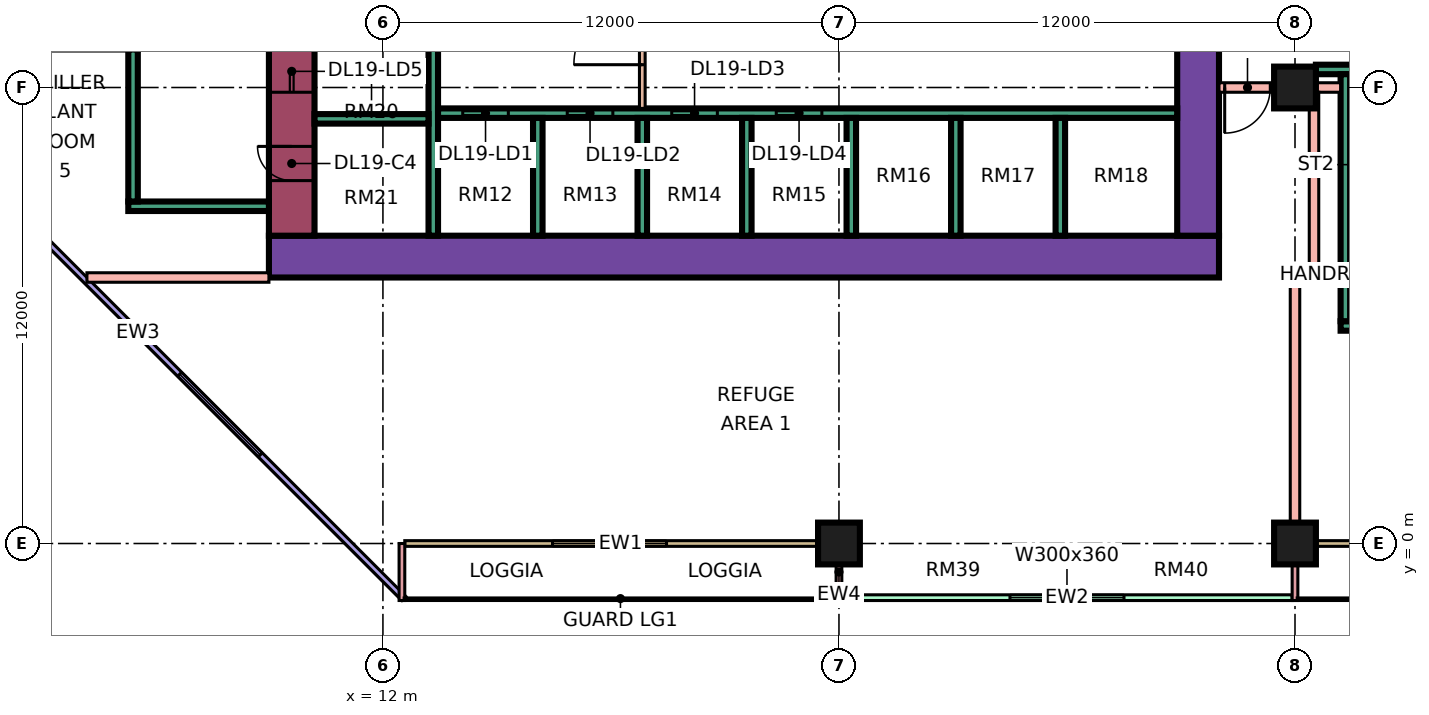
"""IFC4 building model, lengths in metres.
Left out: names, types, materials, properties, quantities, classifications, styles, units other than length and angle.
Written with IfcOpenShell. Run it as: python <this file> out.ifc"""

import sys

from ifc_helpers import new_model, si_unit, direction, frame, frame_2d, origin, origin_2d, place, context, subcontext, project, spatial, rectangle, extrude, element, fill, save


model = new_model("IFC4")
c1 = context("Model", 3, precision=1e-05, world=origin(), true_north=direction((0.0, 1.0)))
c2 = subcontext(c1, "Body", "Model", "MODEL_VIEW")
j1 = project(units=[si_unit("LENGTHUNIT", "METRE"), si_unit("PLANEANGLEUNIT", "RADIAN")], contexts=[c1])
p1 = place(None, origin())
s1 = spatial("IfcSite", under=j1, at=p1, CompositionType="ELEMENT")
p2 = place(p1, origin())
s2 = spatial("IfcBuilding", under=s1, at=p2, CompositionType="ELEMENT")
p3 = place(p2, frame((0.0, 0.0, 86.4)))
s3 = spatial("IfcBuildingStorey", under=s2, at=p3, CompositionType="ELEMENT", Elevation=86.4)
for number, where, z_axis, x_axis in (
    (1, (24.0, 0.0, 0.0), (0.0, 0.0, 1.0), (1.0, 0.0, 0.0)),
    (2, (36.0, 0.0, 0.0), (0.0, 0.0, 1.0), (1.0, 0.0, 0.0)),
    (3, (36.0, 12.0, 0.0), (0.0, 0.0, 1.0), (1.0, 0.0, 0.0)),
):
    element("IfcColumn", number, at=place(p3, frame(where, z_axis=z_axis, x_axis=x_axis)), inside=s3, PredefinedType="COLUMN", context=c2, shape_type="SweptSolid", body=[
        extrude(rectangle(XDim=1.1, YDim=1.1, at=origin_2d()), origin(), (0.0, 0.0, 1.0), 5.5),
    ])
p4 = place(p3, frame((9.0, 7.55, 0.0), z_axis=(0.0, 0.0, 1.0), x_axis=(1.0, 0.0, 0.0)))
e4 = element("IfcWall", 4, at=p4, inside=s3, PredefinedType="SHEAR", context=c2, shape_type="SweptSolid", body=[
    extrude(rectangle(XDim=25.0, YDim=1.1, at=frame_2d((12.5, 0.0))), origin(), (0.0, 0.0, 1.0), 5.5),
])
p5 = place(p3, frame((9.6, 8.1, 0.0), z_axis=(0.0, 0.0, 1.0), x_axis=(0.0, 1.0, 0.0)))
e5 = element("IfcWall", 5, at=p5, inside=s3, PredefinedType="SHEAR", context=c2, shape_type="SweptSolid", body=[
    extrude(rectangle(XDim=10.8, YDim=1.2, at=frame_2d((5.4, 0.0))), origin(), (0.0, 0.0, 1.0), 5.5),
])
p6 = place(p5, frame((3.775, 0.0, 0.0)))
e6 = element("IfcOpeningElement", 6, at=p6, cuts=e5, PredefinedType="OPENING", context=c2, shape_type="SweptSolid", body=[
    extrude(rectangle(XDim=1.1, YDim=2.2, at=frame_2d((0.55, 1.1))), frame((0.0, 0.61, 0.0), z_axis=(0.0, -1.0, 0.0), x_axis=(1.0, 0.0, 0.0)), (0.0, 0.0, 1.0), 1.22),
])
p7 = place(p5, frame((6.275, 0.0, 0.0)))
e7 = element("IfcOpeningElement", 7, at=p7, cuts=e5, PredefinedType="OPENING", context=c2, shape_type="SweptSolid", body=[
    extrude(rectangle(XDim=1.1, YDim=2.2, at=frame_2d((0.55, 1.1))), frame((0.0, 0.61, 0.0), z_axis=(0.0, -1.0, 0.0), x_axis=(1.0, 0.0, 0.0)), (0.0, 0.0, 1.0), 1.22),
])
p8 = place(p5, frame((8.95, 0.0, 0.0)))
e8 = element("IfcOpeningElement", 8, at=p8, cuts=e5, PredefinedType="OPENING", context=c2, shape_type="SweptSolid", body=[
    extrude(rectangle(XDim=1.1, YDim=2.2, at=frame_2d((0.55, 1.1))), frame((0.0, 0.61, 0.0), z_axis=(0.0, -1.0, 0.0), x_axis=(1.0, 0.0, 0.0)), (0.0, 0.0, 1.0), 1.22),
])
p9 = place(p5, frame((1.45, 0.0, 0.0)))
e9 = element("IfcOpeningElement", 9, at=p9, cuts=e5, PredefinedType="OPENING", context=c2, shape_type="SweptSolid", body=[
    extrude(rectangle(XDim=0.9, YDim=2.1, at=frame_2d((0.45, 1.05))), frame((0.0, 0.61, 0.0), z_axis=(0.0, -1.0, 0.0), x_axis=(1.0, 0.0, 0.0)), (0.0, 0.0, 1.0), 1.22),
])
p10 = place(p3, frame((33.45, 8.1, 0.0), z_axis=(0.0, 0.0, 1.0), x_axis=(0.0, 1.0, 0.0)))
e10 = element("IfcWall", 10, at=p10, inside=s3, PredefinedType="SHEAR", context=c2, shape_type="SweptSolid", body=[
    extrude(rectangle(XDim=10.8, YDim=1.1, at=frame_2d((5.4, 0.0))), origin(), (0.0, 0.0, 1.0), 5.5),
])
p11 = place(p10, frame((5.1, 0.0, 0.0)))
e11 = element("IfcOpeningElement", 11, at=p11, cuts=e10, PredefinedType="OPENING", context=c2, shape_type="SweptSolid", body=[
    extrude(rectangle(XDim=1.8, YDim=2.4, at=frame_2d((0.9, 1.2))), frame((0.0, 0.56, 0.0), z_axis=(0.0, -1.0, 0.0), x_axis=(1.0, 0.0, 0.0)), (0.0, 0.0, 1.0), 1.12),
])
p12 = place(p3, frame((13.325, 8.1, 0.0), z_axis=(0.0, 0.0, 1.0), x_axis=(0.0, 1.0, 0.0)))
e12 = element("IfcWall", 12, at=p12, inside=s3, PredefinedType="SHEAR", context=c2, shape_type="SweptSolid", body=[
    extrude(rectangle(XDim=10.8, YDim=0.25, at=frame_2d((5.4, 0.0))), origin(), (0.0, 0.0, 1.0), 5.5),
])
p13 = place(p3, frame((13.45, 11.325, 0.0), z_axis=(0.0, 0.0, 1.0), x_axis=(1.0, 0.0, 0.0)))
e13 = element("IfcWall", 13, at=p13, inside=s3, PredefinedType="SHEAR", context=c2, shape_type="SweptSolid", body=[
    extrude(rectangle(XDim=19.45, YDim=0.25, at=frame_2d((9.725, 0.0))), origin(), (0.0, 0.0, 1.0), 5.5),
])
p14 = place(p13, frame((0.65, 0.0, 0.0)))
e14 = element("IfcOpeningElement", 14, at=p14, cuts=e13, PredefinedType="OPENING", context=c2, shape_type="SweptSolid", body=[
    extrude(rectangle(XDim=1.2, YDim=2.2, at=frame_2d((0.6, 1.1))), frame((0.0, 0.135, 0.0), z_axis=(0.0, -1.0, 0.0), x_axis=(1.0, 0.0, 0.0)), (0.0, 0.0, 1.0), 0.27),
])
p15 = place(p13, frame((3.4, 0.0, 0.0)))
e15 = element("IfcOpeningElement", 15, at=p15, cuts=e13, PredefinedType="OPENING", context=c2, shape_type="SweptSolid", body=[
    extrude(rectangle(XDim=1.2, YDim=2.2, at=frame_2d((0.6, 1.1))), frame((0.0, 0.135, 0.0), z_axis=(0.0, -1.0, 0.0), x_axis=(1.0, 0.0, 0.0)), (0.0, 0.0, 1.0), 0.27),
])
p16 = place(p13, frame((6.15, 0.0, 0.0)))
e16 = element("IfcOpeningElement", 16, at=p16, cuts=e13, PredefinedType="OPENING", context=c2, shape_type="SweptSolid", body=[
    extrude(rectangle(XDim=1.2, YDim=2.2, at=frame_2d((0.6, 1.1))), frame((0.0, 0.135, 0.0), z_axis=(0.0, -1.0, 0.0), x_axis=(1.0, 0.0, 0.0)), (0.0, 0.0, 1.0), 0.27),
])
p17 = place(p13, frame((8.9, 0.0, 0.0)))
e17 = element("IfcOpeningElement", 17, at=p17, cuts=e13, PredefinedType="OPENING", context=c2, shape_type="SweptSolid", body=[
    extrude(rectangle(XDim=1.2, YDim=2.2, at=frame_2d((0.6, 1.1))), frame((0.0, 0.135, 0.0), z_axis=(0.0, -1.0, 0.0), x_axis=(1.0, 0.0, 0.0)), (0.0, 0.0, 1.0), 0.27),
])
p18 = place(p3, frame((10.2, 11.175, 0.0), z_axis=(0.0, 0.0, 1.0), x_axis=(1.0, 0.0, 0.0)))
e18 = element("IfcWall", 18, at=p18, inside=s3, PredefinedType="SHEAR", context=c2, shape_type="SweptSolid", body=[
    extrude(rectangle(XDim=3.0, YDim=0.25, at=frame_2d((1.5, 0.0))), origin(), (0.0, 0.0, 1.0), 5.5),
])
for number, where, z_axis, x_axis in (
    (19, (16.075, 8.1, 0.0), (0.0, 0.0, 1.0), (0.0, 1.0, 0.0)),
    (20, (18.825, 8.1, 0.0), (0.0, 0.0, 1.0), (0.0, 1.0, 0.0)),
    (21, (21.575, 8.1, 0.0), (0.0, 0.0, 1.0), (0.0, 1.0, 0.0)),
    (22, (24.325, 8.1, 0.0), (0.0, 0.0, 1.0), (0.0, 1.0, 0.0)),
    (23, (27.075, 8.1, 0.0), (0.0, 0.0, 1.0), (0.0, 1.0, 0.0)),
    (24, (29.825, 8.1, 0.0), (0.0, 0.0, 1.0), (0.0, 1.0, 0.0)),
):
    element("IfcWall", number, at=place(p3, frame(where, z_axis=z_axis, x_axis=x_axis)), inside=s3, PredefinedType="SHEAR", context=c2, shape_type="SweptSolid", body=[
        extrude(rectangle(XDim=3.1, YDim=0.25, at=frame_2d((1.55, 0.0))), origin(), (0.0, 0.0, 1.0), 5.5),
    ])
p19 = place(p3, frame((5.3, 8.875, 0.0), z_axis=(0.0, 0.0, 1.0), x_axis=(1.0, 0.0, 0.0)))
e25 = element("IfcWall", 25, at=p19, inside=s3, PredefinedType="SHEAR", context=c2, shape_type="SweptSolid", body=[
    extrude(rectangle(XDim=3.7, YDim=0.25, at=frame_2d((1.85, 0.0))), origin(), (0.0, 0.0, 1.0), 5.5),
])
p20 = place(p3, frame((5.425, 9.0, 0.0), z_axis=(0.0, 0.0, 1.0), x_axis=(0.0, 1.0, 0.0)))
e26 = element("IfcWall", 26, at=p20, inside=s3, PredefinedType="SHEAR", context=c2, shape_type="SweptSolid", body=[
    extrude(rectangle(XDim=4.0, YDim=0.25, at=frame_2d((2.0, 0.0))), origin(), (0.0, 0.0, 1.0), 5.5),
])
p21 = place(p3, frame((37.2, 5.725, 0.0), z_axis=(0.0, 0.0, 1.0), x_axis=(1.0, 0.0, 0.0)))
e27 = element("IfcWall", 27, at=p21, inside=s3, PredefinedType="SHEAR", context=c2, shape_type="SweptSolid", body=[
    extrude(rectangle(XDim=3.45, YDim=0.25, at=frame_2d((1.725, 0.0))), origin(), (0.0, 0.0, 1.0), 5.5),
])
p22 = place(p3, frame((36.55, 12.475, 0.0), z_axis=(0.0, 0.0, 1.0), x_axis=(1.0, 0.0, 0.0)))
e28 = element("IfcWall", 28, at=p22, inside=s3, PredefinedType="SHEAR", context=c2, shape_type="SweptSolid", body=[
    extrude(rectangle(XDim=4.1, YDim=0.25, at=frame_2d((2.05, 0.0))), origin(), (0.0, 0.0, 1.0), 5.5),
])
p23 = place(p22, frame((1.825, 0.0, 0.0)))
e29 = element("IfcOpeningElement", 29, at=p23, cuts=e28, PredefinedType="OPENING", context=c2, shape_type="SweptSolid", body=[
    extrude(rectangle(XDim=1.1, YDim=2.2, at=frame_2d((0.55, 1.1))), frame((0.0, 0.135, 0.0), z_axis=(0.0, -1.0, 0.0), x_axis=(1.0, 0.0, 0.0)), (0.0, 0.0, 1.0), 0.27),
])
p24 = place(p3, frame((37.325, 5.85, 0.0), z_axis=(0.0, 0.0, 1.0), x_axis=(0.0, 1.0, 0.0)))
e30 = element("IfcWall", 30, at=p24, inside=s3, PredefinedType="SHEAR", context=c2, shape_type="SweptSolid", body=[
    extrude(rectangle(XDim=6.5, YDim=0.25, at=frame_2d((3.25, 0.0))), origin(), (0.0, 0.0, 1.0), 5.5),
])
p25 = place(p3, frame((-1.447, 12.553, 0.0), z_axis=(0.0, 0.0, 1.0), x_axis=(0.707106781187, -0.707106781187, 0.0)))
e31 = element("IfcWall", 31, at=p25, inside=s3, PredefinedType="SOLIDWALL", context=c2, shape_type="SweptSolid", body=[
    extrude(rectangle(XDim=19.799, YDim=0.15, at=frame_2d((9.899, 0.0))), origin(), (0.0, 0.0, 1.0), 5.1),
])
p26 = place(p25, frame((11.453, 0.0, 0.45)))
e32 = element("IfcOpeningElement", 32, at=p26, cuts=e31, PredefinedType="OPENING", context=c2, shape_type="SweptSolid", body=[
    extrude(rectangle(XDim=3.0, YDim=3.6, at=frame_2d((1.5, 1.8))), frame((0.0, 0.085, 0.0), z_axis=(0.0, -1.0, 0.0), x_axis=(1.0, 0.0, 0.0)), (0.0, 0.0, 1.0), 0.17),
])
p27 = place(p3, frame((12.575, 0.0, 0.0), z_axis=(0.0, 0.0, 1.0), x_axis=(1.0, 0.0, 0.0)))
e33 = element("IfcWall", 33, at=p27, inside=s3, PredefinedType="SOLIDWALL", context=c2, shape_type="SweptSolid", body=[
    extrude(rectangle(XDim=11.35, YDim=0.15, at=frame_2d((5.675, 0.0))), origin(), (0.0, 0.0, 1.0), 5.1),
])
p28 = place(p27, frame((3.887, 0.0, 0.45)))
e34 = element("IfcOpeningElement", 34, at=p28, cuts=e33, PredefinedType="OPENING", context=c2, shape_type="SweptSolid", body=[
    extrude(rectangle(XDim=3.0, YDim=3.6, at=frame_2d((1.5, 1.8))), frame((0.0, 0.085, 0.0), z_axis=(0.0, -1.0, 0.0), x_axis=(1.0, 0.0, 0.0)), (0.0, 0.0, 1.0), 0.17),
])
for number, where, z_axis, x_axis in (
    (35, (12.5, -1.5, 0.0), (0.0, 0.0, 1.0), (0.0, 1.0, 0.0)),
    (36, (24.0, -1.5, 0.0), (0.0, 0.0, 1.0), (0.0, 1.0, 0.0)),
):
    element("IfcWall", number, at=place(p3, frame(where, z_axis=z_axis, x_axis=x_axis)), inside=s3, PredefinedType="SOLIDWALL", context=c2, shape_type="SweptSolid", body=[
        extrude(rectangle(XDim=1.5, YDim=0.15, at=frame_2d((0.75, 0.0))), origin(), (0.0, 0.0, 1.0), 5.1),
    ])
p29 = place(p3, frame((24.075, -1.425, 0.0), z_axis=(0.0, 0.0, 1.0), x_axis=(1.0, 0.0, 0.0)))
e37 = element("IfcWall", 37, at=p29, inside=s3, PredefinedType="SOLIDWALL", context=c2, shape_type="SweptSolid", body=[
    extrude(rectangle(XDim=11.85, YDim=0.15, at=frame_2d((5.925, 0.0))), origin(), (0.0, 0.0, 1.0), 5.1),
])
p30 = place(p29, frame((4.425, 0.0, 0.45)))
e38 = element("IfcOpeningElement", 38, at=p30, cuts=e37, PredefinedType="OPENING", context=c2, shape_type="SweptSolid", body=[
    extrude(rectangle(XDim=3.0, YDim=3.6, at=frame_2d((1.5, 1.8))), frame((0.0, 0.085, 0.0), z_axis=(0.0, -1.0, 0.0), x_axis=(1.0, 0.0, 0.0)), (0.0, 0.0, 1.0), 0.17),
])
p31 = place(p3, frame((36.075, 0.0, 0.0), z_axis=(0.0, 0.0, 1.0), x_axis=(1.0, 0.0, 0.0)))
e39 = element("IfcWall", 39, at=p31, inside=s3, PredefinedType="SOLIDWALL", context=c2, shape_type="SweptSolid", body=[
    extrude(rectangle(XDim=11.85, YDim=0.15, at=frame_2d((5.925, 0.0))), origin(), (0.0, 0.0, 1.0), 5.1),
])
p32 = place(p31, frame((2.925, 0.0, 0.45)))
e40 = element("IfcOpeningElement", 40, at=p32, cuts=e39, PredefinedType="OPENING", context=c2, shape_type="SweptSolid", body=[
    extrude(rectangle(XDim=3.0, YDim=3.6, at=frame_2d((1.5, 1.8))), frame((0.0, 0.085, 0.0), z_axis=(0.0, -1.0, 0.0), x_axis=(1.0, 0.0, 0.0)), (0.0, 0.0, 1.0), 0.17),
])
p33 = place(p31, frame((10.113, 0.0, 0.45)))
e41 = element("IfcOpeningElement", 41, at=p33, cuts=e39, PredefinedType="OPENING", context=c2, shape_type="SweptSolid", body=[
    extrude(rectangle(XDim=1.2, YDim=3.6, at=frame_2d((0.6, 1.8))), frame((0.0, 0.085, 0.0), z_axis=(0.0, -1.0, 0.0), x_axis=(1.0, 0.0, 0.0)), (0.0, 0.0, 1.0), 0.17),
])
p34 = place(p3, frame((36.0, -1.5, 0.0), z_axis=(0.0, 0.0, 1.0), x_axis=(0.0, 1.0, 0.0)))
e42 = element("IfcWall", 42, at=p34, inside=s3, PredefinedType="SOLIDWALL", context=c2, shape_type="SweptSolid", body=[
    extrude(rectangle(XDim=1.5, YDim=0.15, at=frame_2d((0.75, 0.0))), origin(), (0.0, 0.0, 1.0), 5.1),
])
p35 = place(p3, frame((18.825, 11.45, 0.0), z_axis=(0.0, 0.0, 1.0), x_axis=(0.0, 1.0, 0.0)))
e43 = element("IfcWall", 43, at=p35, inside=s3, PredefinedType="PARTITIONING", context=c2, shape_type="SweptSolid", body=[
    extrude(rectangle(XDim=4.1, YDim=0.15, at=frame_2d((2.05, 0.0))), origin(), (0.0, 0.0, 1.0), 5.1),
])
p36 = place(p35, frame((1.15, 0.0, 0.0)))
e44 = element("IfcOpeningElement", 44, at=p36, cuts=e43, PredefinedType="OPENING", context=c2, shape_type="SweptSolid", body=[
    extrude(rectangle(XDim=1.8, YDim=2.4, at=frame_2d((0.9, 1.2))), frame((0.0, 0.085, 0.0), z_axis=(0.0, -1.0, 0.0), x_axis=(1.0, 0.0, 0.0)), (0.0, 0.0, 1.0), 0.17),
])
p37 = place(p3, frame((4.211, 7.0, 0.0), z_axis=(0.0, 0.0, 1.0), x_axis=(1.0, 0.0, 0.0)))
e45 = element("IfcWall", 45, at=p37, inside=s3, PredefinedType="PARTITIONING", context=c2, shape_type="SweptSolid", body=[
    extrude(rectangle(XDim=4.789, YDim=0.25, at=frame_2d((2.395, 0.0))), origin(), (0.0, 0.0, 1.0), 5.1),
])
p38 = place(p3, frame((34.0, 12.0, 0.0), z_axis=(0.0, 0.0, 1.0), x_axis=(1.0, 0.0, 0.0)))
e46 = element("IfcWall", 46, at=p38, inside=s3, PredefinedType="PARTITIONING", context=c2, shape_type="SweptSolid", body=[
    extrude(rectangle(XDim=3.2, YDim=0.25, at=frame_2d((1.6, 0.0))), origin(), (0.0, 0.0, 1.0), 5.1),
])
p39 = place(p38, frame((0.15, 0.0, 0.0)))
e47 = element("IfcOpeningElement", 47, at=p39, cuts=e46, PredefinedType="OPENING", context=c2, shape_type="SweptSolid", body=[
    extrude(rectangle(XDim=1.2, YDim=2.1, at=frame_2d((0.6, 1.05))), frame((0.0, 0.135, 0.0), z_axis=(0.0, -1.0, 0.0), x_axis=(1.0, 0.0, 0.0)), (0.0, 0.0, 1.0), 0.27),
])
p40 = place(p3, frame((36.0, 0.0, 0.0), z_axis=(0.0, 0.0, 1.0), x_axis=(0.0, 1.0, 0.0)))
e48 = element("IfcWall", 48, at=p40, inside=s3, PredefinedType="PARTITIONING", context=c2, shape_type="SweptSolid", body=[
    extrude(rectangle(XDim=7.125, YDim=0.25, at=frame_2d((3.562, 0.0))), origin(), (0.0, 0.0, 1.0), 5.1),
])
p41 = place(p3, frame((36.125, 7.0, 0.0), z_axis=(0.0, 0.0, 1.0), x_axis=(1.0, 0.0, 0.0)))
e49 = element("IfcWall", 49, at=p41, inside=s3, PredefinedType="PARTITIONING", context=c2, shape_type="SweptSolid", body=[
    extrude(rectangle(XDim=0.25, YDim=0.25, at=frame_2d((0.125, 0.0))), origin(), (0.0, 0.0, 1.0), 5.1),
])
p42 = place(p3, frame((36.5, 6.875, 0.0), z_axis=(0.0, 0.0, 1.0), x_axis=(0.0, 1.0, 0.0)))
e50 = element("IfcWall", 50, at=p42, inside=s3, PredefinedType="PARTITIONING", context=c2, shape_type="SweptSolid", body=[
    extrude(rectangle(XDim=5.0, YDim=0.25, at=frame_2d((2.5, 0.0))), origin(), (0.0, 0.0, 1.0), 5.1),
])
p43 = place(p26, origin())
e51 = element("IfcWindow", 51, at=p43, inside=s3, PartitioningType="SINGLE_PANEL", PredefinedType="WINDOW", context=c2, shape_type="SweptSolid", body=[
    extrude(rectangle(XDim=3.0, YDim=3.6, at=frame_2d((1.5, 1.8))), frame((0.0, 0.03, 0.0), z_axis=(0.0, -1.0, 0.0), x_axis=(1.0, 0.0, 0.0)), (0.0, 0.0, 1.0), 0.06),
])
fill(e32, e51)
p44 = place(p28, origin())
e52 = element("IfcWindow", 52, at=p44, inside=s3, PartitioningType="SINGLE_PANEL", PredefinedType="WINDOW", context=c2, shape_type="SweptSolid", body=[
    extrude(rectangle(XDim=3.0, YDim=3.6, at=frame_2d((1.5, 1.8))), frame((0.0, 0.03, 0.0), z_axis=(0.0, -1.0, 0.0), x_axis=(1.0, 0.0, 0.0)), (0.0, 0.0, 1.0), 0.06),
])
fill(e34, e52)
p45 = place(p30, origin())
e53 = element("IfcWindow", 53, at=p45, inside=s3, PartitioningType="SINGLE_PANEL", PredefinedType="WINDOW", context=c2, shape_type="SweptSolid", body=[
    extrude(rectangle(XDim=3.0, YDim=3.6, at=frame_2d((1.5, 1.8))), frame((0.0, 0.03, 0.0), z_axis=(0.0, -1.0, 0.0), x_axis=(1.0, 0.0, 0.0)), (0.0, 0.0, 1.0), 0.06),
])
fill(e38, e53)
p46 = place(p14, origin())
e54 = element("IfcDoor", 54, at=p46, inside=s3, OperationType="DOUBLE_DOOR_SLIDING", PredefinedType="DOOR", context=c2, shape_type="SweptSolid", body=[
    extrude(rectangle(XDim=1.2, YDim=2.2, at=frame_2d((0.6, 1.1))), frame((0.0, 0.025, 0.0), z_axis=(0.0, -1.0, 0.0), x_axis=(1.0, 0.0, 0.0)), (0.0, 0.0, 1.0), 0.05),
])
fill(e14, e54)
p47 = place(p15, origin())
e55 = element("IfcDoor", 55, at=p47, inside=s3, OperationType="DOUBLE_DOOR_SLIDING", PredefinedType="DOOR", context=c2, shape_type="SweptSolid", body=[
    extrude(rectangle(XDim=1.2, YDim=2.2, at=frame_2d((0.6, 1.1))), frame((0.0, 0.025, 0.0), z_axis=(0.0, -1.0, 0.0), x_axis=(1.0, 0.0, 0.0)), (0.0, 0.0, 1.0), 0.05),
])
fill(e15, e55)
p48 = place(p16, origin())
e56 = element("IfcDoor", 56, at=p48, inside=s3, OperationType="DOUBLE_DOOR_SLIDING", PredefinedType="DOOR", context=c2, shape_type="SweptSolid", body=[
    extrude(rectangle(XDim=1.2, YDim=2.2, at=frame_2d((0.6, 1.1))), frame((0.0, 0.025, 0.0), z_axis=(0.0, -1.0, 0.0), x_axis=(1.0, 0.0, 0.0)), (0.0, 0.0, 1.0), 0.05),
])
fill(e16, e56)
p49 = place(p17, origin())
e57 = element("IfcDoor", 57, at=p49, inside=s3, OperationType="DOUBLE_DOOR_SLIDING", PredefinedType="DOOR", context=c2, shape_type="SweptSolid", body=[
    extrude(rectangle(XDim=1.2, YDim=2.2, at=frame_2d((0.6, 1.1))), frame((0.0, 0.025, 0.0), z_axis=(0.0, -1.0, 0.0), x_axis=(1.0, 0.0, 0.0)), (0.0, 0.0, 1.0), 0.05),
])
fill(e17, e57)
p50 = place(p6, origin())
e58 = element("IfcDoor", 58, at=p50, inside=s3, OperationType="DOUBLE_DOOR_SLIDING", PredefinedType="DOOR", context=c2, shape_type="SweptSolid", body=[
    extrude(rectangle(XDim=1.1, YDim=2.2, at=frame_2d((0.55, 1.1))), frame((0.0, 0.025, 0.0), z_axis=(0.0, -1.0, 0.0), x_axis=(1.0, 0.0, 0.0)), (0.0, 0.0, 1.0), 0.05),
])
fill(e6, e58)
p51 = place(p9, frame((0.9, 0.0, 0.0), z_axis=(0.0, 0.0, 1.0), x_axis=(-1.0, 0.0, 0.0)))
e59 = element("IfcDoor", 59, at=p51, inside=s3, OperationType="SINGLE_SWING_RIGHT", PredefinedType="DOOR", context=c2, shape_type="SweptSolid", body=[
    extrude(rectangle(XDim=0.9, YDim=2.1, at=frame_2d((0.45, 1.05))), frame((0.0, 0.025, 0.0), z_axis=(0.0, -1.0, 0.0), x_axis=(1.0, 0.0, 0.0)), (0.0, 0.0, 1.0), 0.05),
])
fill(e9, e59)
p52 = place(p36, origin())
e60 = element("IfcDoor", 60, at=p52, inside=s3, OperationType="DOUBLE_DOOR_SINGLE_SWING", PredefinedType="DOOR", context=c2, shape_type="SweptSolid", body=[
    extrude(rectangle(XDim=1.8, YDim=2.4, at=frame_2d((0.9, 1.2))), frame((0.0, 0.025, 0.0), z_axis=(0.0, -1.0, 0.0), x_axis=(1.0, 0.0, 0.0)), (0.0, 0.0, 1.0), 0.05),
])
fill(e44, e60)
p53 = place(p39, frame((1.2, 0.0, 0.0), z_axis=(0.0, 0.0, 1.0), x_axis=(-1.0, 0.0, 0.0)))
e61 = element("IfcDoor", 61, at=p53, inside=s3, OperationType="SINGLE_SWING_LEFT", PredefinedType="DOOR", context=c2, shape_type="SweptSolid", body=[
    extrude(rectangle(XDim=1.2, YDim=2.1, at=frame_2d((0.6, 1.05))), frame((0.0, 0.025, 0.0), z_axis=(0.0, -1.0, 0.0), x_axis=(1.0, 0.0, 0.0)), (0.0, 0.0, 1.0), 0.05),
])
fill(e47, e61)
save(model, sys.argv[1])
